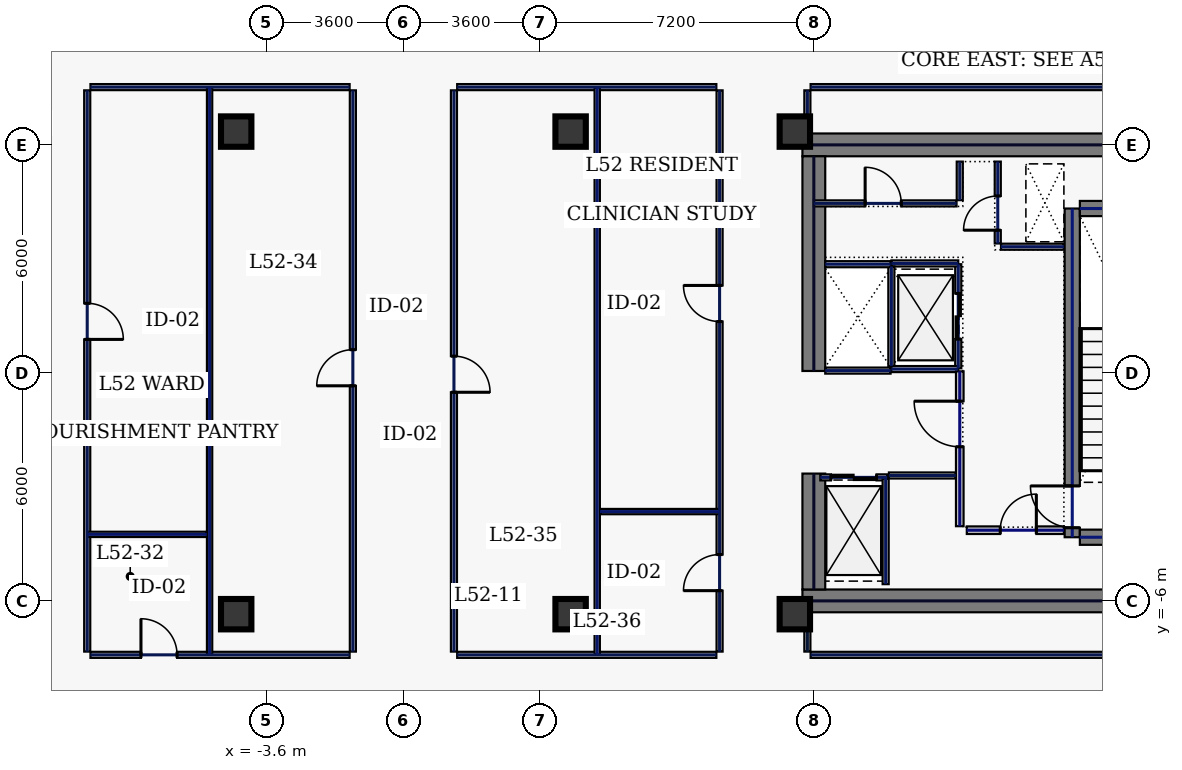
"""IFC4 building model, lengths in metres.
Left out: names, types, materials, properties, quantities, classifications, styles, units other than length and angle.
Written with IfcOpenShell. Run it as: python <this file> out.ifc"""

import sys

from ifc_helpers import new_model, si_unit, direction, frame, frame_2d, origin, origin_2d, place, context, subcontext, project, spatial, rectangle, hollow_rectangle, extrude, element, fill, save


model = new_model("IFC4")
c1 = context("Model", 3, precision=1e-05, world=origin(), true_north=direction((0.0, 1.0)))
c2 = subcontext(c1, "Body", "Model", "MODEL_VIEW")
j1 = project(units=[si_unit("LENGTHUNIT", "METRE"), si_unit("PLANEANGLEUNIT", "RADIAN")], contexts=[c1])
p1 = place(None, origin())
s1 = spatial("IfcSite", under=j1, at=p1, CompositionType="ELEMENT")
p2 = place(p1, origin())
s2 = spatial("IfcBuilding", under=s1, at=p2, CompositionType="ELEMENT")
p3 = place(p2, frame((0.0, 0.0, 226.2)))
s3 = spatial("IfcBuildingStorey", under=s2, at=p3, CompositionType="ELEMENT", Elevation=226.2)
for number, where, z_axis, x_axis in (
    (1, (10.5, 6.0, 0.0), (0.0, 0.0, 1.0), (1.0, 0.0, 0.0)),
    (2, (10.5, -6.0, 0.0), (0.0, 0.0, 1.0), (1.0, 0.0, 0.0)),
):
    element("IfcWall", number, at=place(p3, frame(where, z_axis=z_axis, x_axis=x_axis)), inside=s3, PredefinedType="SHEAR", context=c2, shape_type="SweptSolid", body=[
        extrude(rectangle(XDim=11.5, YDim=0.6, at=frame_2d((5.75, 0.0))), origin(), (0.0, 0.0, 1.0), 3.74),
    ])
p4 = place(p3, frame((10.8, -5.7, 0.0), z_axis=(0.0, 0.0, 1.0), x_axis=(0.0, 1.0, 0.0)))
e3 = element("IfcWall", 3, at=p4, inside=s3, PredefinedType="SHEAR", context=c2, shape_type="SweptSolid", body=[
    extrude(rectangle(XDim=3.05, YDim=0.6, at=frame_2d((1.525, 0.0))), origin(), (0.0, 0.0, 1.0), 3.74),
])
p5 = place(p3, frame((10.8, 0.05, 0.0), z_axis=(0.0, 0.0, 1.0), x_axis=(0.0, 1.0, 0.0)))
e4 = element("IfcWall", 4, at=p5, inside=s3, PredefinedType="SHEAR", context=c2, shape_type="SweptSolid", body=[
    extrude(rectangle(XDim=5.65, YDim=0.6, at=frame_2d((2.825, 0.0))), origin(), (0.0, 0.0, 1.0), 3.74),
])
p6 = place(p3, frame((17.6, -4.325, 0.0), z_axis=(0.0, 0.0, 1.0), x_axis=(0.0, 1.0, 0.0)))
e5 = element("IfcWall", 5, at=p6, inside=s3, PredefinedType="SHEAR", context=c2, shape_type="SweptSolid", body=[
    extrude(rectangle(XDim=8.65, YDim=0.4, at=frame_2d((4.325, 0.0))), origin(), (0.0, 0.0, 1.0), 3.74),
])
p7 = place(p6, frame((0.25, 0.0, 0.0)))
e6 = element("IfcOpeningElement", 6, at=p7, cuts=e5, PredefinedType="OPENING", context=c2, shape_type="SweptSolid", body=[
    extrude(rectangle(XDim=1.1, YDim=2.2, at=frame_2d((0.55, 1.1))), frame((0.0, 0.21, 0.0), z_axis=(0.0, -1.0, 0.0), x_axis=(1.0, 0.0, 0.0)), (0.0, 0.0, 1.0), 0.42),
])
for number, where, z_axis, x_axis in (
    (7, (17.8, -4.325, 0.0), (0.0, 0.0, 1.0), (1.0, 0.0, 0.0)),
    (8, (17.8, 4.325, 0.0), (0.0, 0.0, 1.0), (1.0, 0.0, 0.0)),
):
    element("IfcWall", number, at=place(p3, frame(where, z_axis=z_axis, x_axis=x_axis)), inside=s3, PredefinedType="SHEAR", context=c2, shape_type="SweptSolid", body=[
        extrude(rectangle(XDim=3.4, YDim=0.4, at=frame_2d((1.7, 0.0))), origin(), (0.0, 0.0, 1.0), 3.74),
    ])
for number, where, z_axis, x_axis in (
    (9, (10.3, -6.35, 0.0), (0.0, 0.0, 1.0), (1.0, 0.0, 0.0)),
    (10, (10.3, 6.35, 0.0), (0.0, 0.0, 1.0), (1.0, 0.0, 0.0)),
    (11, (-4.4, -6.35, 0.0), (0.0, 0.0, 1.0), (1.0, 0.0, 0.0)),
    (12, (4.4, -6.35, 0.0), (0.0, 0.0, 1.0), (1.0, 0.0, 0.0)),
    (13, (-4.4, 6.35, 0.0), (0.0, 0.0, 1.0), (1.0, 0.0, 0.0)),
    (14, (4.4, 6.35, 0.0), (0.0, 0.0, 1.0), (1.0, 0.0, 0.0)),
):
    element("IfcColumn", number, at=place(p3, frame(where, z_axis=z_axis, x_axis=x_axis)), inside=s3, PredefinedType="COLUMN", context=c2, shape_type="SweptSolid", body=[
        extrude(hollow_rectangle(XDim=0.8, YDim=0.8, WallThickness=0.036, at=origin_2d()), origin(), (0.0, 0.0, 1.0), 3.74),
    ])
p8 = place(p3, frame((14.6, 0.12, 0.0), z_axis=(0.0, 0.0, 1.0), x_axis=(0.0, 1.0, 0.0)))
e15 = element("IfcWall", 15, at=p8, inside=s3, PredefinedType="PARTITIONING", context=c2, shape_type="SweptSolid", body=[
    extrude(rectangle(XDim=2.74, YDim=0.16, at=frame_2d((1.37, 0.0))), origin(), (0.0, 0.0, 1.0), 3.74),
])
p9 = place(p8, frame((0.77, 0.0, 0.0)))
e16 = element("IfcOpeningElement", 16, at=p9, cuts=e15, PredefinedType="OPENING", context=c2, shape_type="SweptSolid", body=[
    extrude(rectangle(XDim=1.2, YDim=2.2, at=frame_2d((0.6, 1.1))), frame((0.0, 0.09, 0.0), z_axis=(0.0, -1.0, 0.0), x_axis=(1.0, 0.0, 0.0)), (0.0, 0.0, 1.0), 0.18),
])
for number, where, z_axis, x_axis in (
    (17, (12.84, 0.1, 0.0), (0.0, 0.0, 1.0), (1.0, 0.0, 0.0)),
    (18, (12.84, 2.88, 0.0), (0.0, 0.0, 1.0), (1.0, 0.0, 0.0)),
):
    element("IfcWall", number, at=place(p3, frame(where, z_axis=z_axis, x_axis=x_axis)), inside=s3, PredefinedType="PARTITIONING", context=c2, shape_type="SweptSolid", body=[
        extrude(rectangle(XDim=1.76, YDim=0.16, at=frame_2d((0.88, 0.0))), origin(), (0.0, 0.0, 1.0), 3.74),
    ])
p10 = place(p3, frame((12.84, 0.18, 0.0), z_axis=(0.0, 0.0, 1.0), x_axis=(0.0, 1.0, 0.0)))
e19 = element("IfcWall", 19, at=p10, inside=s3, PredefinedType="PARTITIONING", context=c2, shape_type="SweptSolid", body=[
    extrude(rectangle(XDim=2.62, YDim=0.16, at=frame_2d((1.31, 0.0))), origin(), (0.0, 0.0, 1.0), 3.74),
])
p11 = place(p3, frame((10.97, -2.75, 0.0), z_axis=(0.0, 0.0, 1.0), x_axis=(1.0, 0.0, 0.0)))
e20 = element("IfcWall", 20, at=p11, inside=s3, PredefinedType="PARTITIONING", context=c2, shape_type="SweptSolid", body=[
    extrude(rectangle(XDim=1.76, YDim=0.16, at=frame_2d((0.88, 0.0))), origin(), (0.0, 0.0, 1.0), 3.74),
])
p12 = place(p11, frame((0.28, 0.0, 0.0)))
e21 = element("IfcOpeningElement", 21, at=p12, cuts=e20, PredefinedType="OPENING", context=c2, shape_type="SweptSolid", body=[
    extrude(rectangle(XDim=1.2, YDim=2.2, at=frame_2d((0.6, 1.1))), frame((0.0, 0.09, 0.0), z_axis=(0.0, -1.0, 0.0), x_axis=(1.0, 0.0, 0.0)), (0.0, 0.0, 1.0), 0.18),
])
for number, where, z_axis, x_axis in (
    (22, (11.1, 0.06, 0.0), (0.0, 0.0, 1.0), (1.0, 0.0, 0.0)),
    (23, (11.1, 2.86, 0.0), (0.0, 0.0, 1.0), (1.0, 0.0, 0.0)),
):
    element("IfcWall", number, at=place(p3, frame(where, z_axis=z_axis, x_axis=x_axis)), inside=s3, PredefinedType="PARTITIONING", context=c2, shape_type="SweptSolid", body=[
        extrude(rectangle(XDim=1.72, YDim=0.16, at=frame_2d((0.86, 0.0))), origin(), (0.0, 0.0, 1.0), 3.74),
    ])
p13 = place(p3, frame((15.64, 3.405, 0.0), z_axis=(0.0, 0.0, 1.0), x_axis=(0.0, 1.0, 0.0)))
e24 = element("IfcWall", 24, at=p13, inside=s3, PredefinedType="PARTITIONING", context=c2, shape_type="SweptSolid", body=[
    extrude(rectangle(XDim=2.155, YDim=0.16, at=frame_2d((1.078, 0.0))), origin(), (0.0, 0.0, 1.0), 3.74),
])
p14 = place(p13, frame((0.35, 0.0, 0.0)))
e25 = element("IfcOpeningElement", 25, at=p14, cuts=e24, PredefinedType="OPENING", context=c2, shape_type="SweptSolid", body=[
    extrude(rectangle(XDim=0.9, YDim=2.2, at=frame_2d((0.45, 1.1))), frame((0.0, 0.09, 0.0), z_axis=(0.0, -1.0, 0.0), x_axis=(1.0, 0.0, 0.0)), (0.0, 0.0, 1.0), 0.18),
])
p15 = place(p3, frame((15.725, 3.32, 0.0), z_axis=(0.0, 0.0, 1.0), x_axis=(1.0, 0.0, 0.0)))
e26 = element("IfcWall", 26, at=p15, inside=s3, PredefinedType="PARTITIONING", context=c2, shape_type="SweptSolid", body=[
    extrude(rectangle(XDim=1.655, YDim=0.16, at=frame_2d((0.827, 0.0))), origin(), (0.0, 0.0, 1.0), 3.74),
])
p16 = place(p3, frame((14.825, -4.14, 0.0), z_axis=(0.0, 0.0, 1.0), x_axis=(1.0, 0.0, 0.0)))
e27 = element("IfcWall", 27, at=p16, inside=s3, PredefinedType="SOLIDWALL", context=c2, shape_type="SweptSolid", body=[
    extrude(rectangle(XDim=2.555, YDim=0.2, at=frame_2d((1.277, 0.0))), origin(), (0.0, 0.0, 1.0), 3.74),
])
p17 = place(p16, frame((0.88, 0.0, 0.0)))
e28 = element("IfcOpeningElement", 28, at=p17, cuts=e27, PredefinedType="OPENING", context=c2, shape_type="SweptSolid", body=[
    extrude(rectangle(XDim=0.95, YDim=2.2, at=frame_2d((0.475, 1.1))), frame((0.0, 0.11, 0.0), z_axis=(0.0, -1.0, 0.0), x_axis=(1.0, 0.0, 0.0)), (0.0, 0.0, 1.0), 0.22),
])
p18 = place(p3, frame((12.775, -2.7, 0.0), z_axis=(0.0, 0.0, 1.0), x_axis=(1.0, 0.0, 0.0)))
e29 = element("IfcWall", 29, at=p18, inside=s3, PredefinedType="PARTITIONING", context=c2, shape_type="SweptSolid", body=[
    extrude(rectangle(XDim=1.76, YDim=0.16, at=frame_2d((0.88, 0.0))), origin(), (0.0, 0.0, 1.0), 3.74),
])
p19 = place(p3, frame((12.69, -5.56, 0.0), z_axis=(0.0, 0.0, 1.0), x_axis=(0.0, 1.0, 0.0)))
e30 = element("IfcWall", 30, at=p19, inside=s3, PredefinedType="PARTITIONING", context=c2, shape_type="SweptSolid", body=[
    extrude(rectangle(XDim=2.775, YDim=0.16, at=frame_2d((1.388, 0.0))), origin(), (0.0, 0.0, 1.0), 3.74),
])
p20 = place(p3, frame((10.8, 4.46, 0.0), z_axis=(0.0, 0.0, 1.0), x_axis=(1.0, 0.0, 0.0)))
e31 = element("IfcWall", 31, at=p20, inside=s3, PredefinedType="PARTITIONING", context=c2, shape_type="SweptSolid", body=[
    extrude(rectangle(XDim=3.755, YDim=0.16, at=frame_2d((1.877, 0.0))), origin(), (0.0, 0.0, 1.0), 3.74),
])
p21 = place(p20, frame((1.35, 0.0, 0.0)))
e32 = element("IfcOpeningElement", 32, at=p21, cuts=e31, PredefinedType="OPENING", context=c2, shape_type="SweptSolid", body=[
    extrude(rectangle(XDim=0.95, YDim=2.2, at=frame_2d((0.475, 1.1))), frame((0.0, 0.09, 0.0), z_axis=(0.0, -1.0, 0.0), x_axis=(1.0, 0.0, 0.0)), (0.0, 0.0, 1.0), 0.18),
])
p22 = place(p3, frame((14.64, 4.545, 0.0), z_axis=(0.0, 0.0, 1.0), x_axis=(0.0, 1.0, 0.0)))
e33 = element("IfcWall", 33, at=p22, inside=s3, PredefinedType="PARTITIONING", context=c2, shape_type="SweptSolid", body=[
    extrude(rectangle(XDim=1.015, YDim=0.16, at=frame_2d((0.508, 0.0))), origin(), (0.0, 0.0, 1.0), 3.74),
])
p23 = place(p3, frame((14.64, -4.035, 0.0), z_axis=(0.0, 0.0, 1.0), x_axis=(0.0, 1.0, 0.0)))
e34 = element("IfcWall", 34, at=p23, inside=s3, PredefinedType="SOLIDWALL", context=c2, shape_type="SweptSolid", body=[
    extrude(rectangle(XDim=4.075, YDim=0.2, at=frame_2d((2.038, 0.0))), origin(), (0.0, 0.0, 1.0), 3.74),
])
p24 = place(p23, frame((2.09, 0.0, 0.0)))
e35 = element("IfcOpeningElement", 35, at=p24, cuts=e34, PredefinedType="OPENING", context=c2, shape_type="SweptSolid", body=[
    extrude(rectangle(XDim=1.2, YDim=2.2, at=frame_2d((0.6, 1.1))), frame((0.0, 0.11, 0.0), z_axis=(0.0, -1.0, 0.0), x_axis=(1.0, 0.0, 0.0)), (0.0, 0.0, 1.0), 0.22),
])
p25 = place(p3, frame((24.815, 7.52, 0.0), z_axis=(0.0, 0.0, 1.0), x_axis=(-1.0, 0.0, 0.0)))
e36 = element("IfcWall", 36, at=p25, inside=s3, PredefinedType="PARTITIONING", context=c2, shape_type="SweptSolid", body=[
    extrude(rectangle(XDim=14.1, YDim=0.16, at=frame_2d((7.05, 0.0))), origin(), (0.0, 0.0, 1.0), 3.74),
])
p26 = place(p3, frame((10.63, 7.435, 0.0), z_axis=(0.0, 0.0, 1.0), x_axis=(0.0, -1.0, 0.0)))
e37 = element("IfcWall", 37, at=p26, inside=s3, PredefinedType="PARTITIONING", context=c2, shape_type="SweptSolid", body=[
    extrude(rectangle(XDim=1.015, YDim=0.16, at=frame_2d((0.508, 0.0))), origin(), (0.0, 0.0, 1.0), 3.74),
])
p27 = place(p3, frame((10.63, -6.42, 0.0), z_axis=(0.0, 0.0, 1.0), x_axis=(0.0, -1.0, 0.0)))
e38 = element("IfcWall", 38, at=p27, inside=s3, PredefinedType="PARTITIONING", context=c2, shape_type="SweptSolid", body=[
    extrude(rectangle(XDim=0.915, YDim=0.16, at=frame_2d((0.458, 0.0))), origin(), (0.0, 0.0, 1.0), 2.135),
])
p28 = place(p3, frame((10.715, -7.42, 0.0), z_axis=(0.0, 0.0, 1.0), x_axis=(1.0, 0.0, 0.0)))
e39 = element("IfcWall", 39, at=p28, inside=s3, PredefinedType="PARTITIONING", context=c2, shape_type="SweptSolid", body=[
    extrude(rectangle(XDim=14.1, YDim=0.16, at=frame_2d((7.05, 0.0))), origin(), (0.0, 0.0, 1.0), 3.74),
])
p29 = place(p3, frame((8.235, 7.52, 0.0), z_axis=(0.0, 0.0, 1.0), x_axis=(-1.0, 0.0, 0.0)))
e40 = element("IfcWall", 40, at=p29, inside=s3, PredefinedType="PARTITIONING", context=c2, shape_type="SweptSolid", body=[
    extrude(rectangle(XDim=6.82, YDim=0.16, at=frame_2d((3.41, 0.0))), origin(), (0.0, 0.0, 1.0), 3.74),
])
p30 = place(p3, frame((1.33, 7.435, 0.0), z_axis=(0.0, 0.0, 1.0), x_axis=(0.0, -1.0, 0.0)))
e41 = element("IfcWall", 41, at=p30, inside=s3, PredefinedType="PARTITIONING", context=c2, shape_type="SweptSolid", body=[
    extrude(rectangle(XDim=14.77, YDim=0.16, at=frame_2d((7.385, 0.0))), origin(), (0.0, 0.0, 1.0), 3.74),
])
p31 = place(p30, frame((6.995, 0.0, 0.0)))
e42 = element("IfcOpeningElement", 42, at=p31, cuts=e41, PredefinedType="OPENING", context=c2, shape_type="SweptSolid", body=[
    extrude(rectangle(XDim=0.95, YDim=2.2, at=frame_2d((0.475, 1.1))), frame((0.0, 0.09, 0.0), z_axis=(0.0, -1.0, 0.0), x_axis=(1.0, 0.0, 0.0)), (0.0, 0.0, 1.0), 0.18),
])
p32 = place(p3, frame((1.415, -7.42, 0.0), z_axis=(0.0, 0.0, 1.0), x_axis=(1.0, 0.0, 0.0)))
e43 = element("IfcWall", 43, at=p32, inside=s3, PredefinedType="PARTITIONING", context=c2, shape_type="SweptSolid", body=[
    extrude(rectangle(XDim=6.82, YDim=0.16, at=frame_2d((3.41, 0.0))), origin(), (0.0, 0.0, 1.0), 3.74),
])
p33 = place(p3, frame((8.32, -7.335, 0.0), z_axis=(0.0, 0.0, 1.0), x_axis=(0.0, 1.0, 0.0)))
e44 = element("IfcWall", 44, at=p33, inside=s3, PredefinedType="PARTITIONING", context=c2, shape_type="SweptSolid", body=[
    extrude(rectangle(XDim=14.77, YDim=0.16, at=frame_2d((7.385, 0.0))), origin(), (0.0, 0.0, 1.0), 3.74),
])
p34 = place(p33, frame((1.604, 0.0, 0.0)))
e45 = element("IfcOpeningElement", 45, at=p34, cuts=e44, PredefinedType="OPENING", context=c2, shape_type="SweptSolid", body=[
    extrude(rectangle(XDim=0.95, YDim=2.2, at=frame_2d((0.475, 1.1))), frame((0.0, 0.09, 0.0), z_axis=(0.0, -1.0, 0.0), x_axis=(1.0, 0.0, 0.0)), (0.0, 0.0, 1.0), 0.18),
])
p35 = place(p33, frame((8.686, 0.0, 0.0)))
e46 = element("IfcOpeningElement", 46, at=p35, cuts=e44, PredefinedType="OPENING", context=c2, shape_type="SweptSolid", body=[
    extrude(rectangle(XDim=0.95, YDim=2.2, at=frame_2d((0.475, 1.1))), frame((0.0, 0.09, 0.0), z_axis=(0.0, -1.0, 0.0), x_axis=(1.0, 0.0, 0.0)), (0.0, 0.0, 1.0), 0.18),
])
p36 = place(p3, frame((-1.33, -7.335, 0.0), z_axis=(0.0, 0.0, 1.0), x_axis=(0.0, 1.0, 0.0)))
e47 = element("IfcWall", 47, at=p36, inside=s3, PredefinedType="PARTITIONING", context=c2, shape_type="SweptSolid", body=[
    extrude(rectangle(XDim=14.77, YDim=0.16, at=frame_2d((7.385, 0.0))), origin(), (0.0, 0.0, 1.0), 3.74),
])
p37 = place(p36, frame((6.995, 0.0, 0.0)))
e48 = element("IfcOpeningElement", 48, at=p37, cuts=e47, PredefinedType="OPENING", context=c2, shape_type="SweptSolid", body=[
    extrude(rectangle(XDim=0.95, YDim=2.2, at=frame_2d((0.475, 1.1))), frame((0.0, 0.09, 0.0), z_axis=(0.0, -1.0, 0.0), x_axis=(1.0, 0.0, 0.0)), (0.0, 0.0, 1.0), 0.18),
])
p38 = place(p3, frame((-1.415, 7.52, 0.0), z_axis=(0.0, 0.0, 1.0), x_axis=(-1.0, 0.0, 0.0)))
e49 = element("IfcWall", 49, at=p38, inside=s3, PredefinedType="PARTITIONING", context=c2, shape_type="SweptSolid", body=[
    extrude(rectangle(XDim=6.82, YDim=0.16, at=frame_2d((3.41, 0.0))), origin(), (0.0, 0.0, 1.0), 3.74),
])
p39 = place(p3, frame((-8.32, 7.435, 0.0), z_axis=(0.0, 0.0, 1.0), x_axis=(0.0, -1.0, 0.0)))
e50 = element("IfcWall", 50, at=p39, inside=s3, PredefinedType="PARTITIONING", context=c2, shape_type="SweptSolid", body=[
    extrude(rectangle(XDim=14.77, YDim=0.16, at=frame_2d((7.385, 0.0))), origin(), (0.0, 0.0, 1.0), 3.74),
])
p40 = place(p39, frame((5.604, 0.0, 0.0)))
e51 = element("IfcOpeningElement", 51, at=p40, cuts=e50, PredefinedType="OPENING", context=c2, shape_type="SweptSolid", body=[
    extrude(rectangle(XDim=0.95, YDim=2.2, at=frame_2d((0.475, 1.1))), frame((0.0, 0.09, 0.0), z_axis=(0.0, -1.0, 0.0), x_axis=(1.0, 0.0, 0.0)), (0.0, 0.0, 1.0), 0.18),
])
p41 = place(p3, frame((-8.235, -7.42, 0.0), z_axis=(0.0, 0.0, 1.0), x_axis=(1.0, 0.0, 0.0)))
e52 = element("IfcWall", 52, at=p41, inside=s3, PredefinedType="PARTITIONING", context=c2, shape_type="SweptSolid", body=[
    extrude(rectangle(XDim=6.82, YDim=0.16, at=frame_2d((3.41, 0.0))), origin(), (0.0, 0.0, 1.0), 3.74),
])
p42 = place(p41, frame((1.329, 0.0, 0.0)))
e53 = element("IfcOpeningElement", 53, at=p42, cuts=e52, PredefinedType="OPENING", context=c2, shape_type="SweptSolid", body=[
    extrude(rectangle(XDim=0.95, YDim=2.2, at=frame_2d((0.475, 1.1))), frame((0.0, 0.09, 0.0), z_axis=(0.0, -1.0, 0.0), x_axis=(1.0, 0.0, 0.0)), (0.0, 0.0, 1.0), 0.18),
])
for number, where, z_axis, x_axis in (
    (54, (-5.1, -7.415, 0.0), (0.0, 0.0, 1.0), (0.0, 1.0, 0.0)),
    (55, (5.1, -7.415, 0.0), (0.0, 0.0, 1.0), (0.0, 1.0, 0.0)),
):
    element("IfcWall", number, at=place(p3, frame(where, z_axis=z_axis, x_axis=x_axis)), inside=s3, PredefinedType="PARTITIONING", context=c2, shape_type="SweptSolid", body=[
        extrude(rectangle(XDim=14.93, YDim=0.14, at=frame_2d((7.465, 0.0))), origin(), (0.0, 0.0, 1.0), 3.74),
    ])
for number, where, z_axis, x_axis in (
    (56, (-8.315, -4.25, 0.0), (0.0, 0.0, 1.0), (1.0, 0.0, 0.0)),
    (57, (5.175, -3.65, 0.0), (0.0, 0.0, 1.0), (1.0, 0.0, 0.0)),
):
    element("IfcWall", number, at=place(p3, frame(where, z_axis=z_axis, x_axis=x_axis)), inside=s3, PredefinedType="PARTITIONING", context=c2, shape_type="SweptSolid", body=[
        extrude(rectangle(XDim=3.14, YDim=0.14, at=frame_2d((1.57, 0.0))), origin(), (0.0, 0.0, 1.0), 3.74),
    ])
p43 = place(p7, origin())
e58 = element("IfcDoor", 58, at=p43, inside=s3, OperationType="SINGLE_SWING_RIGHT", PredefinedType="DOOR", context=c2, shape_type="SweptSolid", body=[
    extrude(rectangle(XDim=1.1, YDim=2.2, at=frame_2d((0.55, 1.1))), frame((0.0, 0.025, 0.0), z_axis=(0.0, -1.0, 0.0), x_axis=(1.0, 0.0, 0.0)), (0.0, 0.0, 1.0), 0.05),
])
fill(e6, e58)
p44 = place(p9, origin())
e59 = element("IfcDoor", 59, at=p44, inside=s3, OperationType="SLIDING_TO_LEFT", PredefinedType="DOOR", context=c2, shape_type="SweptSolid", body=[
    extrude(rectangle(XDim=1.2, YDim=2.2, at=frame_2d((0.6, 1.1))), frame((0.0, 0.025, 0.0), z_axis=(0.0, -1.0, 0.0), x_axis=(1.0, 0.0, 0.0)), (0.0, 0.0, 1.0), 0.05),
])
fill(e16, e59)
p45 = place(p12, origin())
e60 = element("IfcDoor", 60, at=p45, inside=s3, OperationType="SLIDING_TO_LEFT", PredefinedType="DOOR", context=c2, shape_type="SweptSolid", body=[
    extrude(rectangle(XDim=1.2, YDim=2.2, at=frame_2d((0.6, 1.1))), frame((0.0, 0.025, 0.0), z_axis=(0.0, -1.0, 0.0), x_axis=(1.0, 0.0, 0.0)), (0.0, 0.0, 1.0), 0.05),
])
fill(e21, e60)
p46 = place(p14, origin())
e61 = element("IfcDoor", 61, at=p46, inside=s3, OperationType="SINGLE_SWING_LEFT", PredefinedType="DOOR", context=c2, shape_type="SweptSolid", body=[
    extrude(rectangle(XDim=0.9, YDim=2.2, at=frame_2d((0.45, 1.1))), frame((0.0, 0.025, 0.0), z_axis=(0.0, -1.0, 0.0), x_axis=(1.0, 0.0, 0.0)), (0.0, 0.0, 1.0), 0.05),
])
fill(e25, e61)
p47 = place(p17, origin())
e62 = element("IfcDoor", 62, at=p47, inside=s3, OperationType="SINGLE_SWING_RIGHT", PredefinedType="DOOR", context=c2, shape_type="SweptSolid", body=[
    extrude(rectangle(XDim=0.95, YDim=2.2, at=frame_2d((0.475, 1.1))), frame((0.0, 0.025, 0.0), z_axis=(0.0, -1.0, 0.0), x_axis=(1.0, 0.0, 0.0)), (0.0, 0.0, 1.0), 0.05),
])
fill(e28, e62)
p48 = place(p21, origin())
e63 = element("IfcDoor", 63, at=p48, inside=s3, OperationType="SINGLE_SWING_LEFT", PredefinedType="DOOR", context=c2, shape_type="SweptSolid", body=[
    extrude(rectangle(XDim=0.95, YDim=2.2, at=frame_2d((0.475, 1.1))), frame((0.0, 0.025, 0.0), z_axis=(0.0, -1.0, 0.0), x_axis=(1.0, 0.0, 0.0)), (0.0, 0.0, 1.0), 0.05),
])
fill(e32, e63)
p49 = place(p24, origin())
e64 = element("IfcDoor", 64, at=p49, inside=s3, OperationType="SINGLE_SWING_RIGHT", PredefinedType="DOOR", context=c2, shape_type="SweptSolid", body=[
    extrude(rectangle(XDim=1.2, YDim=2.2, at=frame_2d((0.6, 1.1))), frame((0.0, 0.025, 0.0), z_axis=(0.0, -1.0, 0.0), x_axis=(1.0, 0.0, 0.0)), (0.0, 0.0, 1.0), 0.05),
])
fill(e35, e64)
p50 = place(p42, origin())
e65 = element("IfcDoor", 65, at=p50, inside=s3, OperationType="SINGLE_SWING_LEFT", PredefinedType="DOOR", context=c2, shape_type="SweptSolid", body=[
    extrude(rectangle(XDim=0.95, YDim=2.2, at=frame_2d((0.475, 1.1))), frame((0.0, 0.025, 0.0), z_axis=(0.0, -1.0, 0.0), x_axis=(1.0, 0.0, 0.0)), (0.0, 0.0, 1.0), 0.05),
])
fill(e53, e65)
p51 = place(p40, origin())
e66 = element("IfcDoor", 66, at=p51, inside=s3, OperationType="SINGLE_SWING_RIGHT", PredefinedType="DOOR", context=c2, shape_type="SweptSolid", body=[
    extrude(rectangle(XDim=0.95, YDim=2.2, at=frame_2d((0.475, 1.1))), frame((0.0, 0.025, 0.0), z_axis=(0.0, -1.0, 0.0), x_axis=(1.0, 0.0, 0.0)), (0.0, 0.0, 1.0), 0.05),
])
fill(e51, e66)
p52 = place(p37, origin())
e67 = element("IfcDoor", 67, at=p52, inside=s3, OperationType="SINGLE_SWING_LEFT", PredefinedType="DOOR", context=c2, shape_type="SweptSolid", body=[
    extrude(rectangle(XDim=0.95, YDim=2.2, at=frame_2d((0.475, 1.1))), frame((0.0, 0.025, 0.0), z_axis=(0.0, -1.0, 0.0), x_axis=(1.0, 0.0, 0.0)), (0.0, 0.0, 1.0), 0.05),
])
fill(e48, e67)
p53 = place(p31, origin())
e68 = element("IfcDoor", 68, at=p53, inside=s3, OperationType="SINGLE_SWING_RIGHT", PredefinedType="DOOR", context=c2, shape_type="SweptSolid", body=[
    extrude(rectangle(XDim=0.95, YDim=2.2, at=frame_2d((0.475, 1.1))), frame((0.0, 0.025, 0.0), z_axis=(0.0, -1.0, 0.0), x_axis=(1.0, 0.0, 0.0)), (0.0, 0.0, 1.0), 0.05),
])
fill(e42, e68)
p54 = place(p34, origin())
e69 = element("IfcDoor", 69, at=p54, inside=s3, OperationType="SINGLE_SWING_LEFT", PredefinedType="DOOR", context=c2, shape_type="SweptSolid", body=[
    extrude(rectangle(XDim=0.95, YDim=2.2, at=frame_2d((0.475, 1.1))), frame((0.0, 0.025, 0.0), z_axis=(0.0, -1.0, 0.0), x_axis=(1.0, 0.0, 0.0)), (0.0, 0.0, 1.0), 0.05),
])
fill(e45, e69)
p55 = place(p35, origin())
e70 = element("IfcDoor", 70, at=p55, inside=s3, OperationType="SINGLE_SWING_RIGHT", PredefinedType="DOOR", context=c2, shape_type="SweptSolid", body=[
    extrude(rectangle(XDim=0.95, YDim=2.2, at=frame_2d((0.475, 1.1))), frame((0.0, 0.025, 0.0), z_axis=(0.0, -1.0, 0.0), x_axis=(1.0, 0.0, 0.0)), (0.0, 0.0, 1.0), 0.05),
])
fill(e46, e70)
save(model, sys.argv[1])
